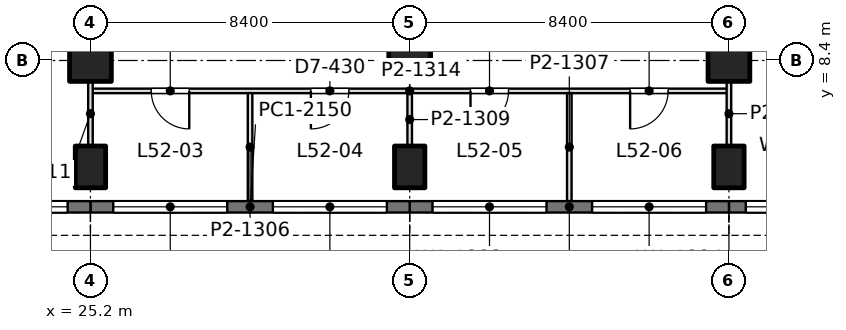
"""IFC4 building model, lengths in metres.
Left out: names, types, materials, properties, quantities, classifications, styles, units other than length and angle.
Written with IfcOpenShell. Run it as: python <this file> out.ifc"""

import sys

from ifc_helpers import new_model, si_unit, direction, frame, frame_2d, origin, origin_2d, place, context, subcontext, project, spatial, rectangle, extrude, element, fill, save


model = new_model("IFC4")
c1 = context("Model", 3, precision=1e-05, world=origin(), true_north=direction((0.0, 1.0)))
c2 = subcontext(c1, "Body", "Model", "MODEL_VIEW")
j1 = project(units=[si_unit("LENGTHUNIT", "METRE"), si_unit("PLANEANGLEUNIT", "RADIAN")], contexts=[c1])
p1 = place(None, origin())
s1 = spatial("IfcSite", under=j1, at=p1, CompositionType="ELEMENT")
p2 = place(p1, origin())
s2 = spatial("IfcBuilding", under=s1, at=p2, CompositionType="ELEMENT")
p3 = place(p2, frame((0.0, 0.0, 228.0)))
s3 = spatial("IfcBuildingStorey", under=s2, at=p3, CompositionType="ELEMENT", Elevation=228.0)
p4 = place(p3, frame((25.2, 5.6, 0.0), z_axis=(0.0, 0.0, 1.0), x_axis=(1.0, 0.0, 0.0)))
e1 = element("IfcColumn", 1, at=p4, inside=s3, PredefinedType="COLUMN", context=c2, shape_type="SweptSolid", body=[
    extrude(rectangle(XDim=0.8, YDim=1.1, at=origin_2d()), origin(), (0.0, 0.0, 1.0), 4.2),
])
p5 = place(p3, frame((25.2, 8.4, 0.0), z_axis=(0.0, 0.0, 1.0), x_axis=(1.0, 0.0, 0.0)))
e2 = element("IfcColumn", 2, at=p5, inside=s3, PredefinedType="COLUMN", context=c2, shape_type="SweptSolid", body=[
    extrude(rectangle(XDim=1.1, YDim=1.1, at=origin_2d()), origin(), (0.0, 0.0, 1.0), 4.2),
])
p6 = place(p3, frame((33.6, 5.6, 0.0), z_axis=(0.0, 0.0, 1.0), x_axis=(1.0, 0.0, 0.0)))
e3 = element("IfcColumn", 3, at=p6, inside=s3, PredefinedType="COLUMN", context=c2, shape_type="SweptSolid", body=[
    extrude(rectangle(XDim=0.8, YDim=1.1, at=origin_2d()), origin(), (0.0, 0.0, 1.0), 4.2),
])
p7 = place(p3, frame((33.6, 8.4, 0.0), z_axis=(0.0, 0.0, 1.0), x_axis=(1.0, 0.0, 0.0)))
e4 = element("IfcColumn", 4, at=p7, inside=s3, PredefinedType="COLUMN", context=c2, shape_type="SweptSolid", body=[
    extrude(rectangle(XDim=1.1, YDim=1.1, at=origin_2d()), origin(), (0.0, 0.0, 1.0), 4.2),
])
p8 = place(p3, frame((42.0, 5.6, 0.0), z_axis=(0.0, 0.0, 1.0), x_axis=(1.0, 0.0, 0.0)))
e5 = element("IfcColumn", 5, at=p8, inside=s3, PredefinedType="COLUMN", context=c2, shape_type="SweptSolid", body=[
    extrude(rectangle(XDim=0.8, YDim=1.1, at=origin_2d()), origin(), (0.0, 0.0, 1.0), 4.2),
])
p9 = place(p3, frame((42.0, 8.4, 0.0), z_axis=(0.0, 0.0, 1.0), x_axis=(1.0, 0.0, 0.0)))
e6 = element("IfcColumn", 6, at=p9, inside=s3, PredefinedType="COLUMN", context=c2, shape_type="SweptSolid", body=[
    extrude(rectangle(XDim=1.1, YDim=1.1, at=origin_2d()), origin(), (0.0, 0.0, 1.0), 4.2),
])
p10 = place(p3, frame((50.085, 4.55, 0.0), z_axis=(0.0, 0.0, 1.0), x_axis=(-1.0, 0.0, 0.0)))
e7 = element("IfcWall", 7, at=p10, inside=s3, PredefinedType="SOLIDWALL", context=c2, shape_type="SweptSolid", body=[
    extrude(rectangle(XDim=8.085, YDim=0.3, at=frame_2d((4.042, 0.0))), origin(), (0.0, 0.0, 1.0), 4.05),
])
p11 = place(p10, frame((0.443, 0.0, 0.9)))
e8 = element("IfcOpeningElement", 8, at=p11, cuts=e7, PredefinedType="OPENING", context=c2, shape_type="SweptSolid", body=[
    extrude(rectangle(XDim=3.0, YDim=1.9, at=frame_2d((1.5, 0.95))), frame((0.0, 0.16, 0.0), z_axis=(0.0, -1.0, 0.0), x_axis=(1.0, 0.0, 0.0)), (0.0, 0.0, 1.0), 0.32),
])
p12 = place(p10, frame((4.643, 0.0, 0.9)))
e9 = element("IfcOpeningElement", 9, at=p12, cuts=e7, PredefinedType="OPENING", context=c2, shape_type="SweptSolid", body=[
    extrude(rectangle(XDim=3.0, YDim=1.9, at=frame_2d((1.5, 0.95))), frame((0.0, 0.16, 0.0), z_axis=(0.0, -1.0, 0.0), x_axis=(1.0, 0.0, 0.0)), (0.0, 0.0, 1.0), 0.32),
])
p13 = place(p3, frame((42.0, 4.55, 0.0), z_axis=(0.0, 0.0, 1.0), x_axis=(-1.0, 0.0, 0.0)))
e10 = element("IfcWall", 10, at=p13, inside=s3, PredefinedType="SOLIDWALL", context=c2, shape_type="SweptSolid", body=[
    extrude(rectangle(XDim=8.4, YDim=0.3, at=frame_2d((4.2, 0.0))), origin(), (0.0, 0.0, 1.0), 4.05),
])
p14 = place(p13, frame((0.6, 0.0, 0.9)))
e11 = element("IfcOpeningElement", 11, at=p14, cuts=e10, PredefinedType="OPENING", context=c2, shape_type="SweptSolid", body=[
    extrude(rectangle(XDim=3.0, YDim=1.9, at=frame_2d((1.5, 0.95))), frame((0.0, 0.16, 0.0), z_axis=(0.0, -1.0, 0.0), x_axis=(1.0, 0.0, 0.0)), (0.0, 0.0, 1.0), 0.32),
])
p15 = place(p13, frame((4.8, 0.0, 0.9)))
e12 = element("IfcOpeningElement", 12, at=p15, cuts=e10, PredefinedType="OPENING", context=c2, shape_type="SweptSolid", body=[
    extrude(rectangle(XDim=3.0, YDim=1.9, at=frame_2d((1.5, 0.95))), frame((0.0, 0.16, 0.0), z_axis=(0.0, -1.0, 0.0), x_axis=(1.0, 0.0, 0.0)), (0.0, 0.0, 1.0), 0.32),
])
p16 = place(p3, frame((33.6, 4.55, 0.0), z_axis=(0.0, 0.0, 1.0), x_axis=(-1.0, 0.0, 0.0)))
e13 = element("IfcWall", 13, at=p16, inside=s3, PredefinedType="SOLIDWALL", context=c2, shape_type="SweptSolid", body=[
    extrude(rectangle(XDim=8.4, YDim=0.3, at=frame_2d((4.2, 0.0))), origin(), (0.0, 0.0, 1.0), 4.05),
])
p17 = place(p16, frame((0.6, 0.0, 0.9)))
e14 = element("IfcOpeningElement", 14, at=p17, cuts=e13, PredefinedType="OPENING", context=c2, shape_type="SweptSolid", body=[
    extrude(rectangle(XDim=3.0, YDim=1.9, at=frame_2d((1.5, 0.95))), frame((0.0, 0.16, 0.0), z_axis=(0.0, -1.0, 0.0), x_axis=(1.0, 0.0, 0.0)), (0.0, 0.0, 1.0), 0.32),
])
p18 = place(p16, frame((4.8, 0.0, 0.9)))
e15 = element("IfcOpeningElement", 15, at=p18, cuts=e13, PredefinedType="OPENING", context=c2, shape_type="SweptSolid", body=[
    extrude(rectangle(XDim=3.0, YDim=1.9, at=frame_2d((1.5, 0.95))), frame((0.0, 0.16, 0.0), z_axis=(0.0, -1.0, 0.0), x_axis=(1.0, 0.0, 0.0)), (0.0, 0.0, 1.0), 0.32),
])
p19 = place(p3, frame((25.2, 4.55, 0.0), z_axis=(0.0, 0.0, 1.0), x_axis=(-1.0, 0.0, 0.0)))
e16 = element("IfcWall", 16, at=p19, inside=s3, PredefinedType="SOLIDWALL", context=c2, shape_type="SweptSolid", body=[
    extrude(rectangle(XDim=8.4, YDim=0.3, at=frame_2d((4.2, 0.0))), origin(), (0.0, 0.0, 1.0), 4.05),
])
p20 = place(p19, frame((0.6, 0.0, 0.9)))
e17 = element("IfcOpeningElement", 17, at=p20, cuts=e16, PredefinedType="OPENING", context=c2, shape_type="SweptSolid", body=[
    extrude(rectangle(XDim=3.0, YDim=1.9, at=frame_2d((1.5, 0.95))), frame((0.0, 0.16, 0.0), z_axis=(0.0, -1.0, 0.0), x_axis=(1.0, 0.0, 0.0)), (0.0, 0.0, 1.0), 0.32),
])
p21 = place(p19, frame((4.8, 0.0, 0.9)))
e18 = element("IfcOpeningElement", 18, at=p21, cuts=e16, PredefinedType="OPENING", context=c2, shape_type="SweptSolid", body=[
    extrude(rectangle(XDim=3.0, YDim=1.9, at=frame_2d((1.5, 0.95))), frame((0.0, 0.16, 0.0), z_axis=(0.0, -1.0, 0.0), x_axis=(1.0, 0.0, 0.0)), (0.0, 0.0, 1.0), 0.32),
])
p22 = place(p3, frame((25.2, 7.6, 0.0), z_axis=(0.0, 0.0, 1.0), x_axis=(1.0, 0.0, 0.0)))
e19 = element("IfcWall", 19, at=p22, inside=s3, PredefinedType="PARTITIONING", context=c2, shape_type="SweptSolid", body=[
    extrude(rectangle(XDim=16.8, YDim=0.12, at=frame_2d((8.4, 0.0))), origin(), (0.0, 0.0, 1.0), 3.69),
])
p23 = place(p22, frame((1.6, 0.0, 0.0)))
e20 = element("IfcOpeningElement", 20, at=p23, cuts=e19, PredefinedType="OPENING", context=c2, shape_type="SweptSolid", body=[
    extrude(rectangle(XDim=1.0, YDim=2.4, at=frame_2d((0.5, 1.2))), frame((0.0, 0.07, 0.0), z_axis=(0.0, -1.0, 0.0), x_axis=(1.0, 0.0, 0.0)), (0.0, 0.0, 1.0), 0.14),
])
p24 = place(p22, frame((5.8, 0.0, 0.0)))
e21 = element("IfcOpeningElement", 21, at=p24, cuts=e19, PredefinedType="OPENING", context=c2, shape_type="SweptSolid", body=[
    extrude(rectangle(XDim=1.0, YDim=2.4, at=frame_2d((0.5, 1.2))), frame((0.0, 0.07, 0.0), z_axis=(0.0, -1.0, 0.0), x_axis=(1.0, 0.0, 0.0)), (0.0, 0.0, 1.0), 0.14),
])
p25 = place(p22, frame((10.0, 0.0, 0.0)))
e22 = element("IfcOpeningElement", 22, at=p25, cuts=e19, PredefinedType="OPENING", context=c2, shape_type="SweptSolid", body=[
    extrude(rectangle(XDim=1.0, YDim=2.4, at=frame_2d((0.5, 1.2))), frame((0.0, 0.07, 0.0), z_axis=(0.0, -1.0, 0.0), x_axis=(1.0, 0.0, 0.0)), (0.0, 0.0, 1.0), 0.14),
])
p26 = place(p22, frame((14.2, 0.0, 0.0)))
e23 = element("IfcOpeningElement", 23, at=p26, cuts=e19, PredefinedType="OPENING", context=c2, shape_type="SweptSolid", body=[
    extrude(rectangle(XDim=1.0, YDim=2.4, at=frame_2d((0.5, 1.2))), frame((0.0, 0.07, 0.0), z_axis=(0.0, -1.0, 0.0), x_axis=(1.0, 0.0, 0.0)), (0.0, 0.0, 1.0), 0.14),
])
p27 = place(p3, frame((25.2, 6.149, 0.0), z_axis=(0.0, 0.0, 1.0), x_axis=(0.0, 1.0, 0.0)))
e24 = element("IfcWall", 24, at=p27, inside=s3, PredefinedType="PARTITIONING", context=c2, shape_type="SweptSolid", body=[
    extrude(rectangle(XDim=1.703, YDim=0.12, at=frame_2d((0.852, 0.0))), origin(), (0.0, 0.0, 1.0), 3.69),
])
p28 = place(p3, frame((29.4, 4.7, 0.0), z_axis=(0.0, 0.0, 1.0), x_axis=(0.0, 1.0, 0.0)))
e25 = element("IfcWall", 25, at=p28, inside=s3, PredefinedType="PARTITIONING", context=c2, shape_type="SweptSolid", body=[
    extrude(rectangle(XDim=2.842, YDim=0.12, at=frame_2d((1.421, 0.0))), origin(), (0.0, 0.0, 1.0), 3.56),
])
p29 = place(p3, frame((33.6, 6.149, 0.0), z_axis=(0.0, 0.0, 1.0), x_axis=(0.0, 1.0, 0.0)))
e26 = element("IfcWall", 26, at=p29, inside=s3, PredefinedType="PARTITIONING", context=c2, shape_type="SweptSolid", body=[
    extrude(rectangle(XDim=1.393, YDim=0.12, at=frame_2d((0.697, 0.0))), origin(), (0.0, 0.0, 1.0), 3.69),
])
p30 = place(p3, frame((37.8, 4.7, 0.0), z_axis=(0.0, 0.0, 1.0), x_axis=(0.0, 1.0, 0.0)))
e27 = element("IfcWall", 27, at=p30, inside=s3, PredefinedType="PARTITIONING", context=c2, shape_type="SweptSolid", body=[
    extrude(rectangle(XDim=2.842, YDim=0.12, at=frame_2d((1.421, 0.0))), origin(), (0.0, 0.0, 1.0), 3.56),
])
p31 = place(p3, frame((42.0, 6.149, 0.0), z_axis=(0.0, 0.0, 1.0), x_axis=(0.0, 1.0, 0.0)))
e28 = element("IfcWall", 28, at=p31, inside=s3, PredefinedType="PARTITIONING", context=c2, shape_type="SweptSolid", body=[
    extrude(rectangle(XDim=1.703, YDim=0.12, at=frame_2d((0.852, 0.0))), origin(), (0.0, 0.0, 1.0), 3.69),
])
p32 = place(p12, origin())
e29 = element("IfcWindow", 29, at=p32, inside=s3, PartitioningType="SINGLE_PANEL", PredefinedType="WINDOW", context=c2, shape_type="SweptSolid", body=[
    extrude(rectangle(XDim=3.0, YDim=1.9, at=frame_2d((1.5, 0.95))), frame((0.0, 0.03, 0.0), z_axis=(0.0, -1.0, 0.0), x_axis=(1.0, 0.0, 0.0)), (0.0, 0.0, 1.0), 0.06),
])
fill(e9, e29)
p33 = place(p14, origin())
e30 = element("IfcWindow", 30, at=p33, inside=s3, PartitioningType="SINGLE_PANEL", PredefinedType="WINDOW", context=c2, shape_type="SweptSolid", body=[
    extrude(rectangle(XDim=3.0, YDim=1.9, at=frame_2d((1.5, 0.95))), frame((0.0, 0.03, 0.0), z_axis=(0.0, -1.0, 0.0), x_axis=(1.0, 0.0, 0.0)), (0.0, 0.0, 1.0), 0.06),
])
fill(e11, e30)
p34 = place(p15, origin())
e31 = element("IfcWindow", 31, at=p34, inside=s3, PartitioningType="SINGLE_PANEL", PredefinedType="WINDOW", context=c2, shape_type="SweptSolid", body=[
    extrude(rectangle(XDim=3.0, YDim=1.9, at=frame_2d((1.5, 0.95))), frame((0.0, 0.03, 0.0), z_axis=(0.0, -1.0, 0.0), x_axis=(1.0, 0.0, 0.0)), (0.0, 0.0, 1.0), 0.06),
])
fill(e12, e31)
p35 = place(p17, origin())
e32 = element("IfcWindow", 32, at=p35, inside=s3, PartitioningType="SINGLE_PANEL", PredefinedType="WINDOW", context=c2, shape_type="SweptSolid", body=[
    extrude(rectangle(XDim=3.0, YDim=1.9, at=frame_2d((1.5, 0.95))), frame((0.0, 0.03, 0.0), z_axis=(0.0, -1.0, 0.0), x_axis=(1.0, 0.0, 0.0)), (0.0, 0.0, 1.0), 0.06),
])
fill(e14, e32)
p36 = place(p18, origin())
e33 = element("IfcWindow", 33, at=p36, inside=s3, PartitioningType="SINGLE_PANEL", PredefinedType="WINDOW", context=c2, shape_type="SweptSolid", body=[
    extrude(rectangle(XDim=3.0, YDim=1.9, at=frame_2d((1.5, 0.95))), frame((0.0, 0.03, 0.0), z_axis=(0.0, -1.0, 0.0), x_axis=(1.0, 0.0, 0.0)), (0.0, 0.0, 1.0), 0.06),
])
fill(e15, e33)
p37 = place(p20, origin())
e34 = element("IfcWindow", 34, at=p37, inside=s3, PartitioningType="SINGLE_PANEL", PredefinedType="WINDOW", context=c2, shape_type="SweptSolid", body=[
    extrude(rectangle(XDim=3.0, YDim=1.9, at=frame_2d((1.5, 0.95))), frame((0.0, 0.03, 0.0), z_axis=(0.0, -1.0, 0.0), x_axis=(1.0, 0.0, 0.0)), (0.0, 0.0, 1.0), 0.06),
])
fill(e17, e34)
p38 = place(p23, frame((1.0, 0.0, 0.0), z_axis=(0.0, 0.0, 1.0), x_axis=(-1.0, 0.0, 0.0)))
e35 = element("IfcDoor", 35, at=p38, inside=s3, OperationType="SINGLE_SWING_LEFT", PredefinedType="DOOR", context=c2, shape_type="SweptSolid", body=[
    extrude(rectangle(XDim=1.0, YDim=2.4, at=frame_2d((0.5, 1.2))), frame((0.0, 0.025, 0.0), z_axis=(0.0, -1.0, 0.0), x_axis=(1.0, 0.0, 0.0)), (0.0, 0.0, 1.0), 0.05),
])
fill(e20, e35)
p39 = place(p24, frame((1.0, 0.0, 0.0), z_axis=(0.0, 0.0, 1.0), x_axis=(-1.0, 0.0, 0.0)))
e36 = element("IfcDoor", 36, at=p39, inside=s3, OperationType="SINGLE_SWING_RIGHT", PredefinedType="DOOR", context=c2, shape_type="SweptSolid", body=[
    extrude(rectangle(XDim=1.0, YDim=2.4, at=frame_2d((0.5, 1.2))), frame((0.0, 0.025, 0.0), z_axis=(0.0, -1.0, 0.0), x_axis=(1.0, 0.0, 0.0)), (0.0, 0.0, 1.0), 0.05),
])
fill(e21, e36)
p40 = place(p25, frame((1.0, 0.0, 0.0), z_axis=(0.0, 0.0, 1.0), x_axis=(-1.0, 0.0, 0.0)))
e37 = element("IfcDoor", 37, at=p40, inside=s3, OperationType="SINGLE_SWING_RIGHT", PredefinedType="DOOR", context=c2, shape_type="SweptSolid", body=[
    extrude(rectangle(XDim=1.0, YDim=2.4, at=frame_2d((0.5, 1.2))), frame((0.0, 0.025, 0.0), z_axis=(0.0, -1.0, 0.0), x_axis=(1.0, 0.0, 0.0)), (0.0, 0.0, 1.0), 0.05),
])
fill(e22, e37)
p41 = place(p26, frame((1.0, 0.0, 0.0), z_axis=(0.0, 0.0, 1.0), x_axis=(-1.0, 0.0, 0.0)))
e38 = element("IfcDoor", 38, at=p41, inside=s3, OperationType="SINGLE_SWING_RIGHT", PredefinedType="DOOR", context=c2, shape_type="SweptSolid", body=[
    extrude(rectangle(XDim=1.0, YDim=2.4, at=frame_2d((0.5, 1.2))), frame((0.0, 0.025, 0.0), z_axis=(0.0, -1.0, 0.0), x_axis=(1.0, 0.0, 0.0)), (0.0, 0.0, 1.0), 0.05),
])
fill(e23, e38)
save(model, sys.argv[1])
